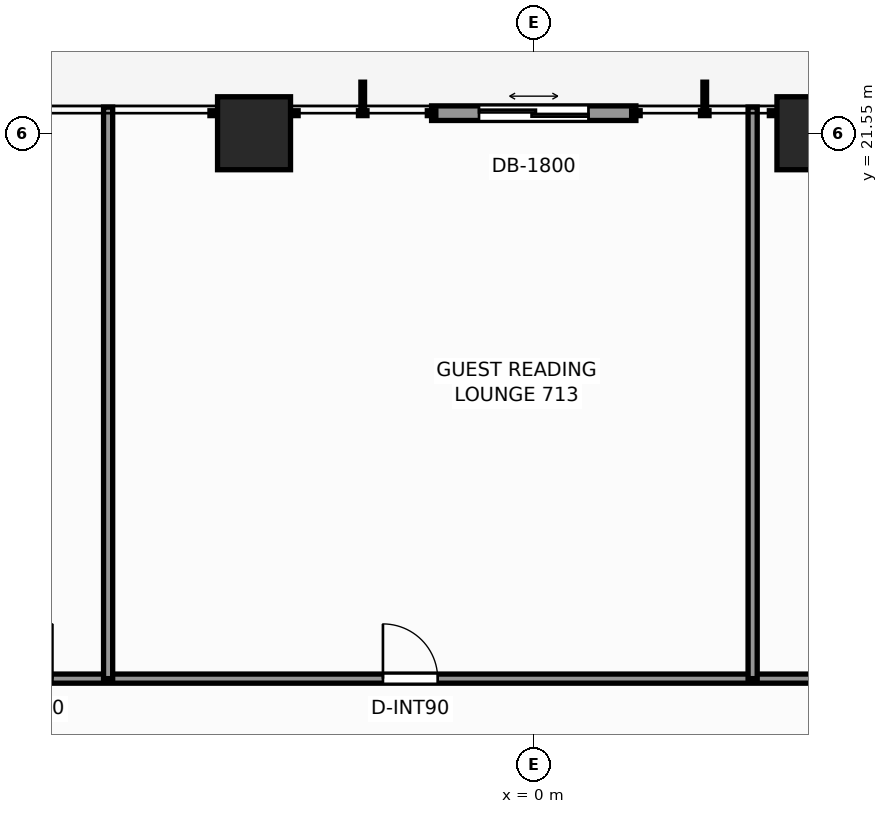
"""IFC4 building model, lengths in metres.
Left out: names, types, materials, properties, quantities, classifications, styles, units other than length and angle.
Written with IfcOpenShell. Run it as: python <this file> out.ifc"""

import sys

from ifc_helpers import new_model, si_unit, direction, frame, frame_2d, origin, origin_2d, place, context, subcontext, project, spatial, rectangle, extrude, element, fill, save


model = new_model("IFC4")
c1 = context("Model", 3, precision=1e-05, world=origin(), true_north=direction((0.0, 1.0)))
c2 = subcontext(c1, "Body", "Model", "MODEL_VIEW")
j1 = project(units=[si_unit("LENGTHUNIT", "METRE"), si_unit("PLANEANGLEUNIT", "RADIAN")], contexts=[c1])
p1 = place(None, origin())
s1 = spatial("IfcSite", under=j1, at=p1, CompositionType="ELEMENT")
p2 = place(p1, origin())
s2 = spatial("IfcBuilding", under=s1, at=p2, CompositionType="ELEMENT")
p3 = place(p2, frame((0.0, 0.0, 27.1)))
s3 = spatial("IfcBuildingStorey", under=s2, at=p3, CompositionType="ELEMENT", Elevation=27.1)
for number, where, z_axis, x_axis in (
    (1, (-4.6, 21.55, 0.0), (0.0, 0.0, 1.0), (1.0, 0.0, 0.0)),
    (2, (4.6, 21.55, 0.0), (0.0, 0.0, 1.0), (1.0, 0.0, 0.0)),
):
    element("IfcColumn", number, at=place(p3, frame(where, z_axis=z_axis, x_axis=x_axis)), inside=s3, PredefinedType="COLUMN", context=c2, shape_type="SweptSolid", body=[
        extrude(rectangle(XDim=1.2, YDim=1.2, at=origin_2d()), origin(), (0.0, 0.0, 1.0), 3.3),
    ])
p4 = place(p3, frame((-1.68, 21.88, 0.0), z_axis=(0.0, 0.0, 1.0), x_axis=(1.0, 0.0, 0.0)))
e3 = element("IfcWall", 3, at=p4, inside=s3, PredefinedType="STANDARD", context=c2, shape_type="SweptSolid", body=[
    extrude(rectangle(XDim=3.36, YDim=0.24, at=frame_2d((1.68, 0.0))), origin(), (0.0, 0.0, 1.0), 3.06),
])
p5 = place(p4, frame((0.78, 0.0, 0.0)))
e4 = element("IfcOpeningElement", 4, at=p5, cuts=e3, PredefinedType="OPENING", context=c2, shape_type="SweptSolid", body=[
    extrude(rectangle(XDim=1.8, YDim=2.2, at=frame_2d((0.9, 1.1))), frame((0.0, 0.13, 0.0), z_axis=(0.0, -1.0, 0.0), x_axis=(1.0, 0.0, 0.0)), (0.0, 0.0, 1.0), 0.26),
])
p6 = place(p3, frame((-12.26, 12.58, 0.0), z_axis=(0.0, 0.0, 1.0), x_axis=(1.0, 0.0, 0.0)))
e5 = element("IfcWall", 5, at=p6, inside=s3, PredefinedType="PARTITIONING", context=c2, shape_type="SweptSolid", body=[
    extrude(rectangle(XDim=24.68, YDim=0.15, at=frame_2d((12.34, 0.0))), origin(), (0.0, 0.0, 1.0), 2.272),
])
p7 = place(p6, frame((3.444, 0.0, 0.0)))
e6 = element("IfcOpeningElement", 6, at=p7, cuts=e5, PredefinedType="OPENING", context=c2, shape_type="SweptSolid", body=[
    extrude(rectangle(XDim=0.9, YDim=2.06, at=frame_2d((0.45, 1.03))), frame((0.0, 0.085, 0.0), z_axis=(0.0, -1.0, 0.0), x_axis=(1.0, 0.0, 0.0)), (0.0, 0.0, 1.0), 0.17),
])
p8 = place(p6, frame((9.78, 0.0, 0.0)))
e7 = element("IfcOpeningElement", 7, at=p8, cuts=e5, PredefinedType="OPENING", context=c2, shape_type="SweptSolid", body=[
    extrude(rectangle(XDim=0.9, YDim=2.06, at=frame_2d((0.45, 1.03))), frame((0.0, 0.085, 0.0), z_axis=(0.0, -1.0, 0.0), x_axis=(1.0, 0.0, 0.0)), (0.0, 0.0, 1.0), 0.17),
])
p9 = place(p6, frame((19.345, 0.0, 0.0)))
e8 = element("IfcOpeningElement", 8, at=p9, cuts=e5, PredefinedType="OPENING", context=c2, shape_type="SweptSolid", body=[
    extrude(rectangle(XDim=0.9, YDim=2.06, at=frame_2d((0.45, 1.03))), frame((0.0, 0.085, 0.0), z_axis=(0.0, -1.0, 0.0), x_axis=(1.0, 0.0, 0.0)), (0.0, 0.0, 1.0), 0.17),
])
for number, where, z_axis, x_axis in (
    (9, (-7.0, 12.58, 0.0), (0.0, 0.0, 1.0), (0.0, 1.0, 0.0)),
    (10, (3.6, 12.58, 0.0), (0.0, 0.0, 1.0), (0.0, 1.0, 0.0)),
):
    element("IfcWall", number, at=place(p3, frame(where, z_axis=z_axis, x_axis=x_axis)), inside=s3, PredefinedType="PARTITIONING", context=c2, shape_type="SweptSolid", body=[
        extrude(rectangle(XDim=9.4, YDim=0.15, at=frame_2d((4.7, 0.0))), origin(), (0.0, 0.0, 1.0), 2.429),
    ])
p10 = place(p5, origin())
e11 = element("IfcDoor", 11, at=p10, inside=s3, OperationType="DOUBLE_DOOR_SLIDING", PredefinedType="DOOR", context=c2, shape_type="SweptSolid", body=[
    extrude(rectangle(XDim=1.8, YDim=2.2, at=frame_2d((0.9, 1.1))), frame((0.0, 0.025, 0.0), z_axis=(0.0, -1.0, 0.0), x_axis=(1.0, 0.0, 0.0)), (0.0, 0.0, 1.0), 0.05),
])
fill(e4, e11)
p11 = place(p7, origin())
e12 = element("IfcDoor", 12, at=p11, inside=s3, OperationType="SINGLE_SWING_RIGHT", PredefinedType="DOOR", context=c2, shape_type="SweptSolid", body=[
    extrude(rectangle(XDim=0.9, YDim=2.06, at=frame_2d((0.45, 1.03))), frame((0.0, 0.025, 0.0), z_axis=(0.0, -1.0, 0.0), x_axis=(1.0, 0.0, 0.0)), (0.0, 0.0, 1.0), 0.05),
])
fill(e6, e12)
p12 = place(p8, origin())
e13 = element("IfcDoor", 13, at=p12, inside=s3, OperationType="SINGLE_SWING_LEFT", PredefinedType="DOOR", context=c2, shape_type="SweptSolid", body=[
    extrude(rectangle(XDim=0.9, YDim=2.06, at=frame_2d((0.45, 1.03))), frame((0.0, 0.025, 0.0), z_axis=(0.0, -1.0, 0.0), x_axis=(1.0, 0.0, 0.0)), (0.0, 0.0, 1.0), 0.05),
])
fill(e7, e13)
save(model, sys.argv[1])
